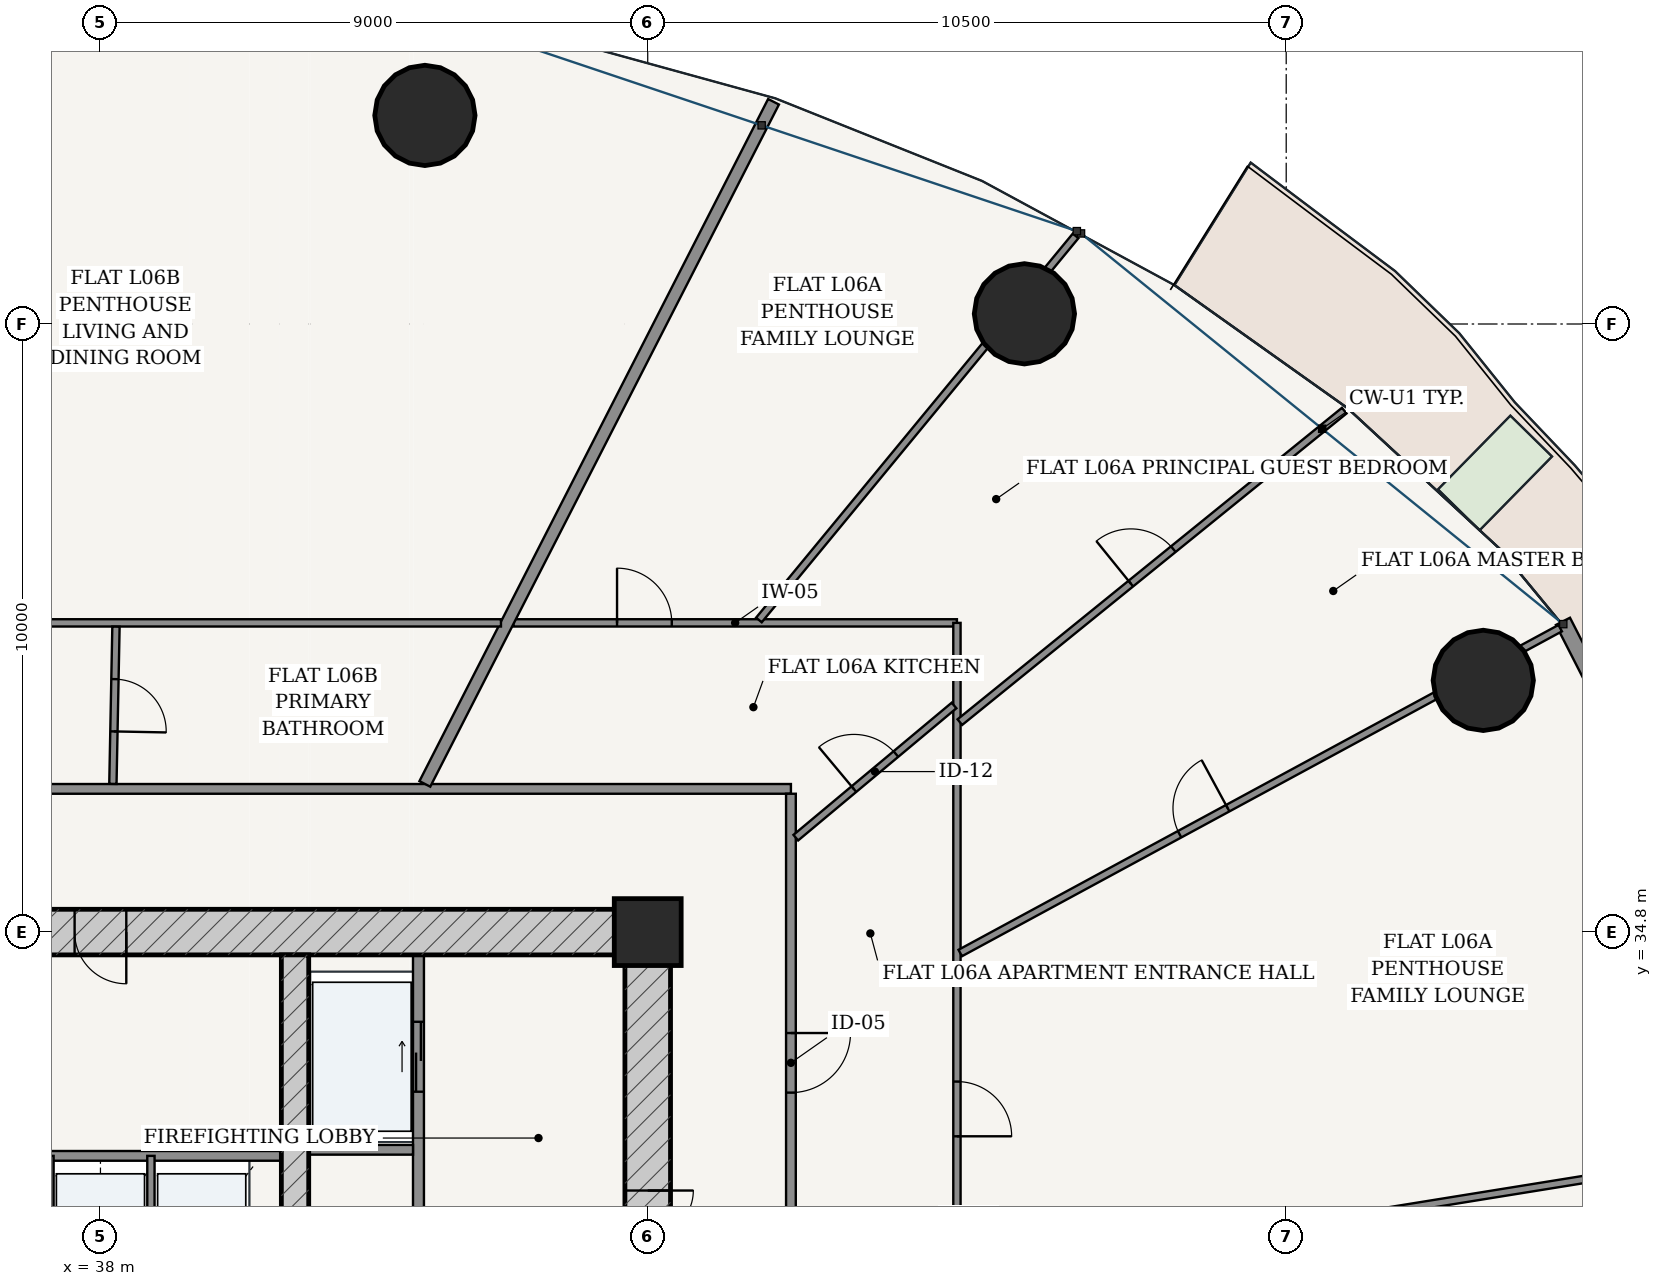
"""IFC4 building model, lengths in metres.
Left out: names, types, materials, properties, quantities, classifications, styles, units other than length and angle.
Written with IfcOpenShell. Run it as: python <this file> out.ifc"""

import sys

from ifc_helpers import new_model, si_unit, direction, frame, frame_2d, origin, origin_2d, place, context, subcontext, project, spatial, rectangle, hollow_circle, extrude, source, transform, mapped, element, fill, save


model = new_model("IFC4")
c1 = context("Model", 3, precision=1e-05, world=origin(), true_north=direction((-0.2419218956, 0.970295726276)))
c2 = subcontext(c1, "Body", "Model", "MODEL_VIEW")
j1 = project(units=[si_unit("LENGTHUNIT", "METRE"), si_unit("PLANEANGLEUNIT", "RADIAN")], contexts=[c1])
p1 = place(None, origin())
s1 = spatial("IfcSite", under=j1, at=p1, CompositionType="ELEMENT")
p2 = place(p1, origin())
s2 = spatial("IfcBuilding", under=s1, at=p2, CompositionType="ELEMENT")
p3 = place(p2, frame((0.0, 0.0, 27.6)))
s3 = spatial("IfcBuildingStorey", under=s2, at=p3, CompositionType="ELEMENT", Elevation=27.6)
p4 = place(p3, frame((47.0, 34.8, 0.0), z_axis=(0.0, 0.0, 1.0), x_axis=(1.0, 0.0, 0.0)))
e1 = element("IfcColumn", 1, at=p4, inside=s3, PredefinedType="COLUMN", context=c2, shape_type="SweptSolid", body=[
    extrude(rectangle(XDim=1.1, YDim=1.1, at=origin_2d()), origin(), (0.0, 0.0, 1.0), 3.6),
])
p5 = place(p3, frame((28.625, 34.8, 0.0), z_axis=(0.0, 0.0, 1.0), x_axis=(1.0, 0.0, 0.0)))
e2 = element("IfcWall", 2, at=p5, inside=s3, PredefinedType="SHEAR", context=c2, shape_type="SweptSolid", body=[
    extrude(rectangle(XDim=18.75, YDim=0.75, at=frame_2d((9.375, 0.0))), origin(), (0.0, 0.0, 1.0), 3.32),
])
p6 = place(p5, frame((8.95, 0.0, 0.0)))
e3 = element("IfcOpeningElement", 3, at=p6, cuts=e2, PredefinedType="OPENING", context=c2, shape_type="SweptSolid", body=[
    extrude(rectangle(XDim=0.85, YDim=2.1, at=frame_2d((0.425, 1.05))), frame((0.0, 0.385, 0.0), z_axis=(0.0, -1.0, 0.0), x_axis=(1.0, 0.0, 0.0)), (0.0, 0.0, 1.0), 0.77),
])
p7 = place(p3, frame((47.0, 19.175, 0.0), z_axis=(0.0, 0.0, 1.0), x_axis=(0.0, 1.0, 0.0)))
e4 = element("IfcWall", 4, at=p7, inside=s3, PredefinedType="SHEAR", context=c2, shape_type="SweptSolid", body=[
    extrude(rectangle(XDim=15.25, YDim=0.75, at=frame_2d((7.625, 0.0))), origin(), (0.0, 0.0, 1.0), 3.32),
])
p8 = place(p7, frame((9.875, 0.0, 0.0)))
e5 = element("IfcOpeningElement", 5, at=p8, cuts=e4, PredefinedType="OPENING", context=c2, shape_type="SweptSolid", body=[
    extrude(rectangle(XDim=1.5, YDim=2.2, at=frame_2d((0.75, 1.1))), frame((0.0, 0.385, 0.0), z_axis=(0.0, -1.0, 0.0), x_axis=(1.0, 0.0, 0.0)), (0.0, 0.0, 1.0), 0.77),
])
p9 = place(p3, frame((41.2, 19.175, 0.0), z_axis=(0.0, 0.0, 1.0), x_axis=(0.0, 1.0, 0.0)))
e6 = element("IfcWall", 6, at=p9, inside=s3, PredefinedType="SHEAR", context=c2, shape_type="SweptSolid", body=[
    extrude(rectangle(XDim=15.25, YDim=0.45, at=frame_2d((7.625, 0.0))), origin(), (0.0, 0.0, 1.0), 3.32),
])
p10 = place(p9, frame((7.8, 0.0, 0.0)))
e7 = element("IfcOpeningElement", 7, at=p10, cuts=e6, PredefinedType="OPENING", context=c2, shape_type="SweptSolid", body=[
    extrude(rectangle(XDim=1.05, YDim=2.15, at=frame_2d((0.525, 1.075))), frame((0.0, 0.235, 0.0), z_axis=(0.0, -1.0, 0.0), x_axis=(1.0, 0.0, 0.0)), (0.0, 0.0, 1.0), 0.47),
])
for number, where, z_axis, x_axis in (
    (8, (60.741, 38.939, 0.0), (0.0, 0.0, 1.0), (1.0, 0.0, 0.0)),
    (9, (53.195, 44.968, 0.0), (0.0, 0.0, 1.0), (1.0, 0.0, 0.0)),
    (10, (43.336, 48.23, 0.0), (0.0, 0.0, 1.0), (1.0, 0.0, 0.0)),
):
    element("IfcColumn", number, at=place(p3, frame(where, z_axis=z_axis, x_axis=x_axis)), inside=s3, PredefinedType="COLUMN", context=c2, shape_type="SweptSolid", body=[
        extrude(hollow_circle(Radius=0.825, WallThickness=0.05, at=origin_2d()), origin(), (0.0, 0.0, 1.0), 3.6),
    ])
p11 = place(p3, frame((66.45, 31.308, 0.0), z_axis=(0.0, 0.0, 1.0), x_axis=(-0.45523081716, 0.890373462715, 0.0)))
e11 = element("IfcWall", 11, at=p11, inside=s3, PredefinedType="SOLIDWALL", context=c2, shape_type="SweptSolid", body=[
    extrude(rectangle(XDim=9.662, YDim=0.26, at=frame_2d((4.831, 0.0))), origin(), (0.0, 0.0, 1.0), 3.32),
])
p12 = place(p11, frame((4.156, 0.0, 0.0)))
e12 = element("IfcOpeningElement", 12, at=p12, cuts=e11, PredefinedType="OPENING", context=c2, shape_type="SweptSolid", body=[
    extrude(rectangle(XDim=1.35, YDim=2.2, at=frame_2d((0.675, 1.1))), frame((0.0, 0.14, 0.0), z_axis=(0.0, -1.0, 0.0), x_axis=(1.0, 0.0, 0.0)), (0.0, 0.0, 1.0), 0.28),
])
p13 = place(p3, frame((43.23, 28.52, 0.0), z_axis=(0.0, 0.0, 1.0), x_axis=(0.0, 1.0, 0.0)))
e13 = element("IfcWall", 13, at=p13, inside=s3, PredefinedType="PARTITIONING", context=c2, shape_type="SweptSolid", body=[
    extrude(rectangle(XDim=5.905, YDim=0.18, at=frame_2d((2.953, 0.0))), origin(), (0.0, 0.0, 1.0), 3.32),
])
p14 = place(p13, frame((0.905, 0.0, 0.0)))
e14 = element("IfcOpeningElement", 14, at=p14, cuts=e13, PredefinedType="OPENING", context=c2, shape_type="SweptSolid", body=[
    extrude(rectangle(XDim=0.85, YDim=2.1, at=frame_2d((0.425, 1.05))), frame((0.0, 0.1, 0.0), z_axis=(0.0, -1.0, 0.0), x_axis=(1.0, 0.0, 0.0)), (0.0, 0.0, 1.0), 0.2),
])
p15 = place(p13, frame((3.655, 0.0, 0.0)))
e15 = element("IfcOpeningElement", 15, at=p15, cuts=e13, PredefinedType="OPENING", context=c2, shape_type="SweptSolid", body=[
    extrude(rectangle(XDim=1.15, YDim=2.2, at=frame_2d((0.575, 1.1))), frame((0.0, 0.1, 0.0), z_axis=(0.0, -1.0, 0.0), x_axis=(1.0, 0.0, 0.0)), (0.0, 0.0, 1.0), 0.2),
])
p16 = place(p3, frame((41.425, 31.22, 0.0), z_axis=(0.0, 0.0, 1.0), x_axis=(1.0, 0.0, 0.0)))
e16 = element("IfcWall", 16, at=p16, inside=s3, PredefinedType="PARTITIONING", context=c2, shape_type="SweptSolid", body=[
    extrude(rectangle(XDim=1.715, YDim=0.16, at=frame_2d((0.857, 0.0))), origin(), (0.0, 0.0, 1.0), 3.32),
])
p17 = place(p3, frame((35.025, 31.12, 0.0), z_axis=(0.0, 0.0, 1.0), x_axis=(1.0, 0.0, 0.0)))
e17 = element("IfcWall", 17, at=p17, inside=s3, PredefinedType="PARTITIONING", context=c2, shape_type="SweptSolid", body=[
    extrude(rectangle(XDim=5.95, YDim=0.16, at=frame_2d((2.975, 0.0))), origin(), (0.0, 0.0, 1.0), 3.32),
])
for number, where, z_axis, x_axis in (
    (18, (37.17, 28.56, 0.0), (0.0, 0.0, 1.0), (0.0, 1.0, 0.0)),
    (19, (38.83, 28.56, 0.0), (0.0, 0.0, 1.0), (0.0, 1.0, 0.0)),
):
    element("IfcWall", number, at=place(p3, frame(where, z_axis=z_axis, x_axis=x_axis)), inside=s3, PredefinedType="PARTITIONING", context=c2, shape_type="SweptSolid", body=[
        extrude(rectangle(XDim=2.56, YDim=0.12, at=frame_2d((1.28, 0.0))), origin(), (0.0, 0.0, 1.0), 3.32),
    ])
p18 = place(p3, frame((26.645, 37.155, 0.0), z_axis=(0.0, 0.0, 1.0), x_axis=(1.0, 0.0, 0.0)))
e20 = element("IfcWall", 20, at=p18, inside=s3, PredefinedType="PARTITIONING", context=c2, shape_type="SweptSolid", body=[
    extrude(rectangle(XDim=22.71, YDim=0.16, at=frame_2d((11.355, 0.0))), origin(), (0.0, 0.0, 1.0), 2.688),
])
p19 = place(p18, frame((7.446, 0.0, 0.0)))
e21 = element("IfcOpeningElement", 21, at=p19, cuts=e20, PredefinedType="OPENING", context=c2, shape_type="SweptSolid", body=[
    extrude(rectangle(XDim=0.98, YDim=2.2, at=frame_2d((0.49, 1.1))), frame((0.0, 0.09, 0.0), z_axis=(0.0, -1.0, 0.0), x_axis=(1.0, 0.0, 0.0)), (0.0, 0.0, 1.0), 0.18),
])
p20 = place(p3, frame((49.355, 16.525, 0.0), z_axis=(0.0, 0.0, 1.0), x_axis=(0.0, 1.0, 0.0)))
e22 = element("IfcWall", 22, at=p20, inside=s3, PredefinedType="PARTITIONING", context=c2, shape_type="SweptSolid", body=[
    extrude(rectangle(XDim=20.55, YDim=0.16, at=frame_2d((10.275, 0.0))), origin(), (0.0, 0.0, 1.0), 2.688),
])
p21 = place(p20, frame((15.635, 0.0, 0.0)))
e23 = element("IfcOpeningElement", 23, at=p21, cuts=e22, PredefinedType="OPENING", context=c2, shape_type="SweptSolid", body=[
    extrude(rectangle(XDim=0.98, YDim=2.2, at=frame_2d((0.49, 1.1))), frame((0.0, 0.09, 0.0), z_axis=(0.0, -1.0, 0.0), x_axis=(1.0, 0.0, 0.0)), (0.0, 0.0, 1.0), 0.18),
])
p22 = place(p3, frame((44.791, 39.885, 0.0), z_axis=(0.0, 0.0, 1.0), x_axis=(1.0, 0.0, 0.0)))
e24 = element("IfcWall", 24, at=p22, inside=s3, PredefinedType="PARTITIONING", context=c2, shape_type="SweptSolid", body=[
    extrude(rectangle(XDim=7.294, YDim=0.12, at=frame_2d((3.647, 0.0))), origin(), (0.0, 0.0, 1.0), 2.688),
])
p23 = place(p22, frame((1.705, 0.0, 0.0)))
e25 = element("IfcOpeningElement", 25, at=p23, cuts=e24, PredefinedType="OPENING", context=c2, shape_type="SweptSolid", body=[
    extrude(rectangle(XDim=0.9, YDim=2.15, at=frame_2d((0.45, 1.075))), frame((0.0, 0.07, 0.0), z_axis=(0.0, -1.0, 0.0), x_axis=(1.0, 0.0, 0.0)), (0.0, 0.0, 1.0), 0.14),
])
p24 = place(p3, frame((52.085, 39.885, 0.0), z_axis=(0.0, 0.0, 1.0), x_axis=(0.0, -1.0, 0.0)))
e26 = element("IfcWall", 26, at=p24, inside=s3, PredefinedType="PARTITIONING", context=c2, shape_type="SweptSolid", body=[
    extrude(rectangle(XDim=15.253, YDim=0.12, at=frame_2d((7.627, 0.0))), origin(), (0.0, 0.0, 1.0), 2.688),
])
p25 = place(p24, frame((7.543, 0.0, 0.0)))
e27 = element("IfcOpeningElement", 27, at=p25, cuts=e26, PredefinedType="OPENING", context=c2, shape_type="SweptSolid", body=[
    extrude(rectangle(XDim=0.9, YDim=2.15, at=frame_2d((0.45, 1.075))), frame((0.0, 0.07, 0.0), z_axis=(0.0, -1.0, 0.0), x_axis=(1.0, 0.0, 0.0)), (0.0, 0.0, 1.0), 0.14),
])
p26 = place(p3, frame((52.146, 29.08, 0.0), z_axis=(0.0, 0.0, 1.0), x_axis=(0.987255773689, 0.159141563768, 0.0)))
e28 = element("IfcWall", 28, at=p26, inside=s3, PredefinedType="PARTITIONING", context=c2, shape_type="SweptSolid", body=[
    extrude(rectangle(XDim=14.359, YDim=0.12, at=frame_2d((7.18, 0.0))), origin(), (0.0, 0.0, 1.0), 2.688),
])
p27 = place(p26, frame((5.659, 0.0, 0.0)))
e29 = element("IfcOpeningElement", 29, at=p27, cuts=e28, PredefinedType="OPENING", context=c2, shape_type="SweptSolid", body=[
    extrude(rectangle(XDim=0.9, YDim=2.15, at=frame_2d((0.45, 1.075))), frame((0.0, 0.07, 0.0), z_axis=(0.0, -1.0, 0.0), x_axis=(1.0, 0.0, 0.0)), (0.0, 0.0, 1.0), 0.14),
])
p28 = place(p3, frame((52.139, 34.456, 0.0), z_axis=(0.0, 0.0, 1.0), x_axis=(0.879372452045, 0.476134529922, 0.0)))
e30 = element("IfcWall", 30, at=p28, inside=s3, PredefinedType="PARTITIONING", context=c2, shape_type="SweptSolid", body=[
    extrude(rectangle(XDim=11.219, YDim=0.12, at=frame_2d((5.61, 0.0))), origin(), (0.0, 0.0, 1.0), 2.688),
])
p29 = place(p28, frame((4.102, 0.0, 0.0)))
e31 = element("IfcOpeningElement", 31, at=p29, cuts=e30, PredefinedType="OPENING", context=c2, shape_type="SweptSolid", body=[
    extrude(rectangle(XDim=0.9, YDim=2.15, at=frame_2d((0.45, 1.075))), frame((0.0, 0.07, 0.0), z_axis=(0.0, -1.0, 0.0), x_axis=(1.0, 0.0, 0.0)), (0.0, 0.0, 1.0), 0.14),
])
p30 = place(p3, frame((52.133, 38.253, 0.0), z_axis=(0.0, 0.0, 1.0), x_axis=(0.776936623447, 0.629578814087, 0.0)))
e32 = element("IfcWall", 32, at=p30, inside=s3, PredefinedType="PARTITIONING", context=c2, shape_type="SweptSolid", body=[
    extrude(rectangle(XDim=8.136, YDim=0.12, at=frame_2d((4.068, 0.0))), origin(), (0.0, 0.0, 1.0), 2.762),
])
p31 = place(p30, frame((3.618, 0.0, 0.0)))
e33 = element("IfcOpeningElement", 33, at=p31, cuts=e32, PredefinedType="OPENING", context=c2, shape_type="SweptSolid", body=[
    extrude(rectangle(XDim=0.9, YDim=2.15, at=frame_2d((0.45, 1.075))), frame((0.0, 0.07, 0.0), z_axis=(0.0, -1.0, 0.0), x_axis=(1.0, 0.0, 0.0)), (0.0, 0.0, 1.0), 0.14),
])
p32 = place(p3, frame((48.829, 39.933, 0.0), z_axis=(0.0, 0.0, 1.0), x_axis=(0.636192172227, 0.771530634516, 0.0)))
e34 = element("IfcWall", 34, at=p32, inside=s3, PredefinedType="PARTITIONING", context=c2, shape_type="SweptSolid", body=[
    extrude(rectangle(XDim=8.186, YDim=0.12, at=frame_2d((4.093, 0.0))), origin(), (0.0, 0.0, 1.0), 2.688),
])
p33 = place(p3, frame((49.435, 36.353, 0.0), z_axis=(0.0, 0.0, 1.0), x_axis=(0.76742398833, 0.641139939589, 0.0)))
e35 = element("IfcWall", 35, at=p33, inside=s3, PredefinedType="PARTITIONING", context=c2, shape_type="SweptSolid", body=[
    extrude(rectangle(XDim=3.391, YDim=0.12, at=frame_2d((1.695, 0.0))), origin(), (0.0, 0.0, 1.0), 2.999),
])
p34 = place(p33, frame((1.246, 0.0, 0.0)))
e36 = element("IfcOpeningElement", 36, at=p34, cuts=e35, PredefinedType="OPENING", context=c2, shape_type="SweptSolid", body=[
    extrude(rectangle(XDim=0.9, YDim=2.15, at=frame_2d((0.45, 1.075))), frame((0.0, 0.07, 0.0), z_axis=(0.0, -1.0, 0.0), x_axis=(1.0, 0.0, 0.0)), (0.0, 0.0, 1.0), 0.14),
])
p35 = place(p3, frame((43.335, 37.237, 0.0), z_axis=(0.0, 0.0, 1.0), x_axis=(0.455148959499, 0.890415310216, 0.0)))
e37 = element("IfcWall", 37, at=p35, inside=s3, PredefinedType="PARTITIONING", context=c2, shape_type="SweptSolid", body=[
    extrude(rectangle(XDim=12.598, YDim=0.2, at=frame_2d((6.299, 0.0))), origin(), (0.0, 0.0, 1.0), 2.762),
])
p36 = place(p3, frame((23.915, 39.885, 0.0), z_axis=(0.0, 0.0, 1.0), x_axis=(1.0, 0.0, 0.0)))
e38 = element("IfcWall", 38, at=p36, inside=s3, PredefinedType="PARTITIONING", context=c2, shape_type="SweptSolid", body=[
    extrude(rectangle(XDim=20.671, YDim=0.12, at=frame_2d((10.336, 0.0))), origin(), (0.0, 0.0, 1.0), 2.688),
])
p37 = place(p36, frame((10.444, 0.0, 0.0)))
e39 = element("IfcOpeningElement", 39, at=p37, cuts=e38, PredefinedType="OPENING", context=c2, shape_type="SweptSolid", body=[
    extrude(rectangle(XDim=0.9, YDim=2.15, at=frame_2d((0.45, 1.075))), frame((0.0, 0.07, 0.0), z_axis=(0.0, -1.0, 0.0), x_axis=(1.0, 0.0, 0.0)), (0.0, 0.0, 1.0), 0.14),
])
p38 = place(p3, frame((38.205, 37.237, 0.0), z_axis=(0.0, 0.0, 1.0), x_axis=(0.019633676934, 0.999807240787, 0.0)))
e40 = element("IfcWall", 40, at=p38, inside=s3, PredefinedType="PARTITIONING", context=c2, shape_type="SweptSolid", body=[
    extrude(rectangle(XDim=2.586, YDim=0.12, at=frame_2d((1.293, 0.0))), origin(), (0.0, 0.0, 1.0), 3.32),
])
p39 = place(p38, frame((0.863, 0.0, 0.0)))
e41 = element("IfcOpeningElement", 41, at=p39, cuts=e40, PredefinedType="OPENING", context=c2, shape_type="SweptSolid", body=[
    extrude(rectangle(XDim=0.86, YDim=2.15, at=frame_2d((0.43, 1.075))), frame((0.0, 0.07, 0.0), z_axis=(0.0, -1.0, 0.0), x_axis=(1.0, 0.0, 0.0)), (0.0, 0.0, 1.0), 0.14),
])
m1 = source(origin(), c2, "Body", "SweptSolid", [
    extrude(rectangle(XDim=1.5, YDim=2.2, at=frame_2d((0.75, 1.1))), frame((0.0, 0.025, 0.0), z_axis=(0.0, -1.0, 0.0), x_axis=(1.0, 0.0, 0.0)), (0.0, 0.0, 1.0), 0.05),
])
p40 = place(p8, frame((1.5, 0.0, 0.0), z_axis=(0.0, 0.0, 1.0), x_axis=(-1.0, 0.0, 0.0)))
e42 = element("IfcDoor", 42, at=p40, inside=s3, OperationType="DOUBLE_DOOR_SINGLE_SWING", PredefinedType="DOOR", context=c2, shape_type="MappedRepresentation", body=[
    mapped(m1, transform((0.0, 0.0, 0.0), scale=1.0)),
])
fill(e5, e42)
m2 = source(origin(), c2, "Body", "SweptSolid", [
    extrude(rectangle(XDim=0.85, YDim=2.1, at=frame_2d((0.425, 1.05))), frame((0.0, 0.025, 0.0), z_axis=(0.0, -1.0, 0.0), x_axis=(1.0, 0.0, 0.0)), (0.0, 0.0, 1.0), 0.05),
])
p41 = place(p6, frame((0.85, 0.0, 0.0), z_axis=(0.0, 0.0, 1.0), x_axis=(-1.0, 0.0, 0.0)))
e43 = element("IfcDoor", 43, at=p41, inside=s3, OperationType="SINGLE_SWING_LEFT", PredefinedType="DOOR", context=c2, shape_type="MappedRepresentation", body=[
    mapped(m2, transform((0.0, 0.0, 0.0), scale=1.0)),
])
fill(e3, e43)
m3 = source(origin(), c2, "Body", "SweptSolid", [
    extrude(rectangle(XDim=1.15, YDim=2.2, at=frame_2d((0.575, 1.1))), frame((0.0, 0.025, 0.0), z_axis=(0.0, -1.0, 0.0), x_axis=(1.0, 0.0, 0.0)), (0.0, 0.0, 1.0), 0.05),
])
p42 = place(p15, origin())
e44 = element("IfcDoor", 44, at=p42, inside=s3, OperationType="DOUBLE_DOOR_SLIDING", PredefinedType="DOOR", context=c2, shape_type="MappedRepresentation", body=[
    mapped(m3, transform((0.0, 0.0, 0.0), scale=1.0)),
])
fill(e15, e44)
m4 = source(origin(), c2, "Body", "SweptSolid", [
    extrude(rectangle(XDim=0.98, YDim=2.2, at=frame_2d((0.49, 1.1))), frame((0.0, 0.025, 0.0), z_axis=(0.0, -1.0, 0.0), x_axis=(1.0, 0.0, 0.0)), (0.0, 0.0, 1.0), 0.05),
])
p43 = place(p21, frame((0.98, 0.0, 0.0), z_axis=(0.0, 0.0, 1.0), x_axis=(-1.0, 0.0, 0.0)))
e45 = element("IfcDoor", 45, at=p43, inside=s3, OperationType="SINGLE_SWING_LEFT", PredefinedType="DOOR", context=c2, shape_type="MappedRepresentation", body=[
    mapped(m4, transform((0.0, 0.0, 0.0), scale=1.0)),
])
fill(e23, e45)
m5 = source(origin(), c2, "Body", "SweptSolid", [
    extrude(rectangle(XDim=0.9, YDim=2.15, at=frame_2d((0.45, 1.075))), frame((0.0, 0.025, 0.0), z_axis=(0.0, -1.0, 0.0), x_axis=(1.0, 0.0, 0.0)), (0.0, 0.0, 1.0), 0.05),
])
p44 = place(p34, origin())
e46 = element("IfcDoor", 46, at=p44, inside=s3, OperationType="SINGLE_SWING_LEFT", PredefinedType="DOOR", context=c2, shape_type="MappedRepresentation", body=[
    mapped(m5, transform((0.0, 0.0, 0.0), scale=1.0)),
])
fill(e36, e46)
p45 = place(p25, origin())
e47 = element("IfcDoor", 47, at=p45, inside=s3, OperationType="SINGLE_SWING_RIGHT", PredefinedType="DOOR", context=c2, shape_type="MappedRepresentation", body=[
    mapped(m5, transform((0.0, 0.0, 0.0), scale=1.0)),
])
fill(e27, e47)
p46 = place(p23, origin())
e48 = element("IfcDoor", 48, at=p46, inside=s3, OperationType="SINGLE_SWING_LEFT", PredefinedType="DOOR", context=c2, shape_type="MappedRepresentation", body=[
    mapped(m5, transform((0.0, 0.0, 0.0), scale=1.0)),
])
fill(e25, e48)
p47 = place(p29, origin())
e49 = element("IfcDoor", 49, at=p47, inside=s3, OperationType="SINGLE_SWING_RIGHT", PredefinedType="DOOR", context=c2, shape_type="MappedRepresentation", body=[
    mapped(m5, transform((0.0, 0.0, 0.0), scale=1.0)),
])
fill(e31, e49)
p48 = place(p31, origin())
e50 = element("IfcDoor", 50, at=p48, inside=s3, OperationType="SINGLE_SWING_LEFT", PredefinedType="DOOR", context=c2, shape_type="MappedRepresentation", body=[
    mapped(m5, transform((0.0, 0.0, 0.0), scale=1.0)),
])
fill(e33, e50)
m6 = source(origin(), c2, "Body", "SweptSolid", [
    extrude(rectangle(XDim=0.86, YDim=2.15, at=frame_2d((0.43, 1.075))), frame((0.0, 0.025, 0.0), z_axis=(0.0, -1.0, 0.0), x_axis=(1.0, 0.0, 0.0)), (0.0, 0.0, 1.0), 0.05),
])
p49 = place(p39, frame((0.86, 0.0, 0.0), z_axis=(0.0, 0.0, 1.0), x_axis=(-1.0, 0.0, 0.0)))
e51 = element("IfcDoor", 51, at=p49, inside=s3, OperationType="SINGLE_SWING_RIGHT", PredefinedType="DOOR", context=c2, shape_type="MappedRepresentation", body=[
    mapped(m6, transform((0.0, 0.0, 0.0), scale=1.0)),
])
fill(e41, e51)
save(model, sys.argv[1])
